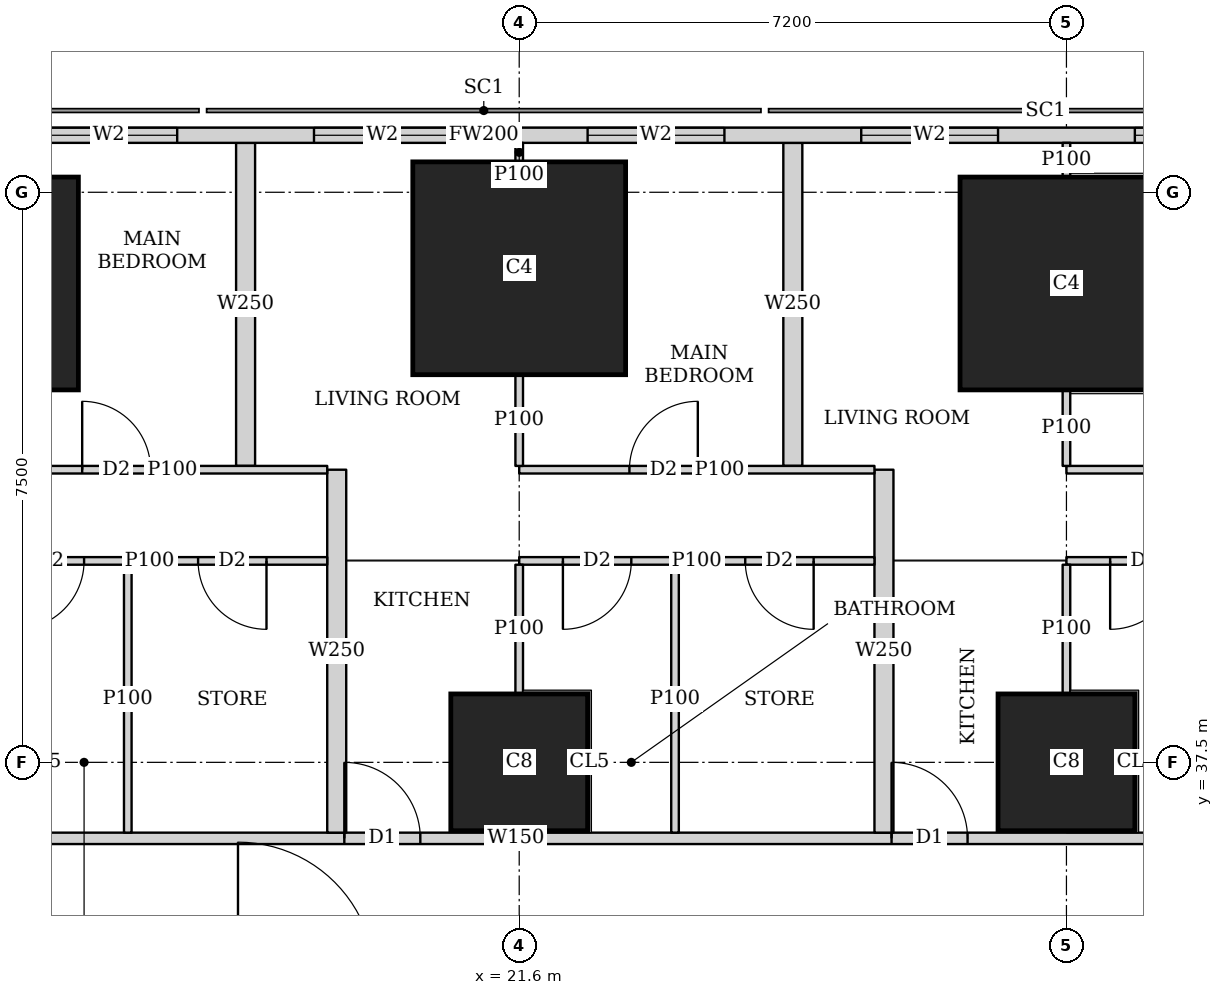
"""IFC4 building model, lengths in metres.
Left out: names, types, materials, properties, quantities, classifications, styles, units other than length and angle.
Written with IfcOpenShell. Run it as: python <this file> out.ifc"""

import sys

from ifc_helpers import new_model, si_unit, direction, frame, frame_2d, origin, origin_2d, place, context, subcontext, project, spatial, rectangle, extrude, element, fill, save


model = new_model("IFC4")
c1 = context("Model", 3, precision=1e-05, world=origin(), true_north=direction((0.0, 1.0)))
c2 = subcontext(c1, "Body", "Model", "MODEL_VIEW")
j1 = project(units=[si_unit("LENGTHUNIT", "METRE"), si_unit("PLANEANGLEUNIT", "RADIAN")], contexts=[c1])
p1 = place(None, origin())
s1 = spatial("IfcSite", under=j1, at=p1, CompositionType="ELEMENT")
p2 = place(p1, origin())
s2 = spatial("IfcBuilding", under=s1, at=p2, CompositionType="ELEMENT")
p3 = place(p2, frame((0.0, 0.0, 68.75)))
s3 = spatial("IfcBuildingStorey", under=s2, at=p3, CompositionType="ELEMENT", Elevation=68.75)
for number, where, z_axis, x_axis in (
    (1, (21.6, 37.5, 0.0), (0.0, 0.0, 1.0), (1.0, 0.0, 0.0)),
    (2, (28.8, 37.5, 0.0), (0.0, 0.0, 1.0), (1.0, 0.0, 0.0)),
):
    element("IfcColumn", number, at=place(p3, frame(where, z_axis=z_axis, x_axis=x_axis)), inside=s3, PredefinedType="COLUMN", context=c2, shape_type="SweptSolid", body=[
        extrude(rectangle(XDim=1.8, YDim=1.8, at=origin_2d()), origin(), (0.0, 0.0, 1.0), 3.75),
    ])
for number, where, z_axis, x_axis in (
    (3, (14.4, 43.8, 0.0), (0.0, 0.0, 1.0), (1.0, 0.0, 0.0)),
    (4, (21.6, 44.0, 0.0), (0.0, 0.0, 1.0), (1.0, 0.0, 0.0)),
    (5, (28.8, 43.8, 0.0), (0.0, 0.0, 1.0), (1.0, 0.0, 0.0)),
):
    element("IfcColumn", number, at=place(p3, frame(where, z_axis=z_axis, x_axis=x_axis)), inside=s3, PredefinedType="COLUMN", context=c2, shape_type="SweptSolid", body=[
        extrude(rectangle(XDim=2.8, YDim=2.8, at=origin_2d()), origin(), (0.0, 0.0, 1.0), 3.75),
    ])
p4 = place(p3, frame((40.106, 45.75, 0.0), z_axis=(0.0, 0.0, 1.0), x_axis=(-1.0, 0.0, 0.0)))
e6 = element("IfcWall", 6, at=p4, inside=s3, PredefinedType="SOLIDWALL", context=c2, shape_type="SweptSolid", body=[
    extrude(rectangle(XDim=37.943, YDim=0.2, at=frame_2d((18.971, 0.0))), origin(), (0.0, 0.0, 1.0), 3.45),
])
p5 = place(p4, frame((8.606, 0.0, 0.9)))
e7 = element("IfcOpeningElement", 7, at=p5, cuts=e6, PredefinedType="OPENING", context=c2, shape_type="SweptSolid", body=[
    extrude(rectangle(XDim=1.8, YDim=1.5, at=frame_2d((0.9, 0.75))), frame((0.0, 0.11, 0.0), z_axis=(0.0, -1.0, 0.0), x_axis=(1.0, 0.0, 0.0)), (0.0, 0.0, 1.0), 0.22),
])
p6 = place(p4, frame((12.206, 0.0, 0.9)))
e8 = element("IfcOpeningElement", 8, at=p6, cuts=e6, PredefinedType="OPENING", context=c2, shape_type="SweptSolid", body=[
    extrude(rectangle(XDim=1.8, YDim=1.5, at=frame_2d((0.9, 0.75))), frame((0.0, 0.11, 0.0), z_axis=(0.0, -1.0, 0.0), x_axis=(1.0, 0.0, 0.0)), (0.0, 0.0, 1.0), 0.22),
])
p7 = place(p4, frame((15.806, 0.0, 0.9)))
e9 = element("IfcOpeningElement", 9, at=p7, cuts=e6, PredefinedType="OPENING", context=c2, shape_type="SweptSolid", body=[
    extrude(rectangle(XDim=1.8, YDim=1.5, at=frame_2d((0.9, 0.75))), frame((0.0, 0.11, 0.0), z_axis=(0.0, -1.0, 0.0), x_axis=(1.0, 0.0, 0.0)), (0.0, 0.0, 1.0), 0.22),
])
p8 = place(p4, frame((19.406, 0.0, 0.9)))
e10 = element("IfcOpeningElement", 10, at=p8, cuts=e6, PredefinedType="OPENING", context=c2, shape_type="SweptSolid", body=[
    extrude(rectangle(XDim=1.8, YDim=1.5, at=frame_2d((0.9, 0.75))), frame((0.0, 0.11, 0.0), z_axis=(0.0, -1.0, 0.0), x_axis=(1.0, 0.0, 0.0)), (0.0, 0.0, 1.0), 0.22),
])
p9 = place(p4, frame((23.006, 0.0, 0.9)))
e11 = element("IfcOpeningElement", 11, at=p9, cuts=e6, PredefinedType="OPENING", context=c2, shape_type="SweptSolid", body=[
    extrude(rectangle(XDim=1.8, YDim=1.5, at=frame_2d((0.9, 0.75))), frame((0.0, 0.11, 0.0), z_axis=(0.0, -1.0, 0.0), x_axis=(1.0, 0.0, 0.0)), (0.0, 0.0, 1.0), 0.22),
])
p10 = place(p4, frame((26.606, 0.0, 0.9)))
e12 = element("IfcOpeningElement", 12, at=p10, cuts=e6, PredefinedType="OPENING", context=c2, shape_type="SweptSolid", body=[
    extrude(rectangle(XDim=1.8, YDim=1.5, at=frame_2d((0.9, 0.75))), frame((0.0, 0.11, 0.0), z_axis=(0.0, -1.0, 0.0), x_axis=(1.0, 0.0, 0.0)), (0.0, 0.0, 1.0), 0.22),
])
p11 = place(p3, frame((8.35, 36.5, 0.0), z_axis=(0.0, 0.0, 1.0), x_axis=(1.0, 0.0, 0.0)))
e13 = element("IfcWall", 13, at=p11, inside=s3, PredefinedType="SOLIDWALL", context=c2, shape_type="SweptSolid", body=[
    extrude(rectangle(XDim=26.415, YDim=0.15, at=frame_2d((13.208, 0.0))), origin(), (0.0, 0.0, 1.0), 3.45),
])
p12 = place(p11, frame((2.6, 0.0, 0.0)))
e14 = element("IfcOpeningElement", 14, at=p12, cuts=e13, PredefinedType="OPENING", context=c2, shape_type="SweptSolid", body=[
    extrude(rectangle(XDim=1.0, YDim=2.1, at=frame_2d((0.5, 1.05))), frame((0.0, 0.085, 0.0), z_axis=(0.0, -1.0, 0.0), x_axis=(1.0, 0.0, 0.0)), (0.0, 0.0, 1.0), 0.17),
])
p13 = place(p11, frame((10.949, 0.0, 0.0)))
e15 = element("IfcOpeningElement", 15, at=p13, cuts=e13, PredefinedType="OPENING", context=c2, shape_type="SweptSolid", body=[
    extrude(rectangle(XDim=1.0, YDim=2.1, at=frame_2d((0.5, 1.05))), frame((0.0, 0.085, 0.0), z_axis=(0.0, -1.0, 0.0), x_axis=(1.0, 0.0, 0.0)), (0.0, 0.0, 1.0), 0.17),
])
p14 = place(p11, frame((18.149, 0.0, 0.0)))
e16 = element("IfcOpeningElement", 16, at=p14, cuts=e13, PredefinedType="OPENING", context=c2, shape_type="SweptSolid", body=[
    extrude(rectangle(XDim=1.0, YDim=2.1, at=frame_2d((0.5, 1.05))), frame((0.0, 0.085, 0.0), z_axis=(0.0, -1.0, 0.0), x_axis=(1.0, 0.0, 0.0)), (0.0, 0.0, 1.0), 0.17),
])
p15 = place(p3, frame((14.4, 41.35, 0.0), z_axis=(0.0, 0.0, 1.0), x_axis=(1.0, 0.0, 0.0)))
e17 = element("IfcWall", 17, at=p15, inside=s3, PredefinedType="PARTITIONING", context=c2, shape_type="SweptSolid", body=[
    extrude(rectangle(XDim=4.674, YDim=0.1, at=frame_2d((2.337, 0.0))), origin(), (0.0, 0.0, 1.0), 3.45),
])
p16 = place(p15, frame((1.45, 0.0, 0.0)))
e18 = element("IfcOpeningElement", 18, at=p16, cuts=e17, PredefinedType="OPENING", context=c2, shape_type="SweptSolid", body=[
    extrude(rectangle(XDim=0.9, YDim=2.1, at=frame_2d((0.45, 1.05))), frame((0.0, 0.06, 0.0), z_axis=(0.0, -1.0, 0.0), x_axis=(1.0, 0.0, 0.0)), (0.0, 0.0, 1.0), 0.12),
])
p17 = place(p3, frame((14.4, 40.15, 0.0), z_axis=(0.0, 0.0, 1.0), x_axis=(1.0, 0.0, 0.0)))
e19 = element("IfcWall", 19, at=p17, inside=s3, PredefinedType="PARTITIONING", context=c2, shape_type="SweptSolid", body=[
    extrude(rectangle(XDim=4.674, YDim=0.1, at=frame_2d((2.337, 0.0))), origin(), (0.0, 0.0, 1.0), 3.45),
])
p18 = place(p17, frame((0.575, 0.0, 0.0)))
e20 = element("IfcOpeningElement", 20, at=p18, cuts=e19, PredefinedType="OPENING", context=c2, shape_type="SweptSolid", body=[
    extrude(rectangle(XDim=0.9, YDim=2.1, at=frame_2d((0.45, 1.05))), frame((0.0, 0.06, 0.0), z_axis=(0.0, -1.0, 0.0), x_axis=(1.0, 0.0, 0.0)), (0.0, 0.0, 1.0), 0.12),
])
p19 = place(p17, frame((2.975, 0.0, 0.0)))
e21 = element("IfcOpeningElement", 21, at=p19, cuts=e19, PredefinedType="OPENING", context=c2, shape_type="SweptSolid", body=[
    extrude(rectangle(XDim=0.9, YDim=2.1, at=frame_2d((0.45, 1.05))), frame((0.0, 0.06, 0.0), z_axis=(0.0, -1.0, 0.0), x_axis=(1.0, 0.0, 0.0)), (0.0, 0.0, 1.0), 0.12),
])
p20 = place(p3, frame((16.45, 36.575, 0.0), z_axis=(0.0, 0.0, 1.0), x_axis=(0.0, 1.0, 0.0)))
e22 = element("IfcWall", 22, at=p20, inside=s3, PredefinedType="PARTITIONING", context=c2, shape_type="SweptSolid", body=[
    extrude(rectangle(XDim=3.525, YDim=0.1, at=frame_2d((1.763, 0.0))), origin(), (0.0, 0.0, 1.0), 3.45),
])
p21 = place(p3, frame((21.6, 41.35, 0.0), z_axis=(0.0, 0.0, 1.0), x_axis=(1.0, 0.0, 0.0)))
e23 = element("IfcWall", 23, at=p21, inside=s3, PredefinedType="PARTITIONING", context=c2, shape_type="SweptSolid", body=[
    extrude(rectangle(XDim=4.674, YDim=0.1, at=frame_2d((2.337, 0.0))), origin(), (0.0, 0.0, 1.0), 3.45),
])
p22 = place(p21, frame((1.45, 0.0, 0.0)))
e24 = element("IfcOpeningElement", 24, at=p22, cuts=e23, PredefinedType="OPENING", context=c2, shape_type="SweptSolid", body=[
    extrude(rectangle(XDim=0.9, YDim=2.1, at=frame_2d((0.45, 1.05))), frame((0.0, 0.06, 0.0), z_axis=(0.0, -1.0, 0.0), x_axis=(1.0, 0.0, 0.0)), (0.0, 0.0, 1.0), 0.12),
])
p23 = place(p3, frame((21.6, 40.15, 0.0), z_axis=(0.0, 0.0, 1.0), x_axis=(1.0, 0.0, 0.0)))
e25 = element("IfcWall", 25, at=p23, inside=s3, PredefinedType="PARTITIONING", context=c2, shape_type="SweptSolid", body=[
    extrude(rectangle(XDim=4.674, YDim=0.1, at=frame_2d((2.337, 0.0))), origin(), (0.0, 0.0, 1.0), 3.45),
])
p24 = place(p23, frame((0.575, 0.0, 0.0)))
e26 = element("IfcOpeningElement", 26, at=p24, cuts=e25, PredefinedType="OPENING", context=c2, shape_type="SweptSolid", body=[
    extrude(rectangle(XDim=0.9, YDim=2.1, at=frame_2d((0.45, 1.05))), frame((0.0, 0.06, 0.0), z_axis=(0.0, -1.0, 0.0), x_axis=(1.0, 0.0, 0.0)), (0.0, 0.0, 1.0), 0.12),
])
p25 = place(p23, frame((2.974, 0.0, 0.0)))
e27 = element("IfcOpeningElement", 27, at=p25, cuts=e25, PredefinedType="OPENING", context=c2, shape_type="SweptSolid", body=[
    extrude(rectangle(XDim=0.9, YDim=2.1, at=frame_2d((0.45, 1.05))), frame((0.0, 0.06, 0.0), z_axis=(0.0, -1.0, 0.0), x_axis=(1.0, 0.0, 0.0)), (0.0, 0.0, 1.0), 0.12),
])
p26 = place(p3, frame((21.6, 41.4, 0.0), z_axis=(0.0, 0.0, 1.0), x_axis=(0.0, 1.0, 0.0)))
e28 = element("IfcWall", 28, at=p26, inside=s3, PredefinedType="PARTITIONING", context=c2, shape_type="SweptSolid", body=[
    extrude(rectangle(XDim=1.199, YDim=0.1, at=frame_2d((0.6, 0.0))), origin(), (0.0, 0.0, 1.0), 3.45),
])
p27 = place(p3, frame((21.6, 45.401, 0.0), z_axis=(0.0, 0.0, 1.0), x_axis=(0.0, 1.0, 0.0)))
e29 = element("IfcWall", 29, at=p27, inside=s3, PredefinedType="PARTITIONING", context=c2, shape_type="SweptSolid", body=[
    extrude(rectangle(XDim=0.249, YDim=0.1, at=frame_2d((0.125, 0.0))), origin(), (0.0, 0.0, 1.0), 3.45),
])
p28 = place(p3, frame((21.6, 38.401, 0.0), z_axis=(0.0, 0.0, 1.0), x_axis=(0.0, 1.0, 0.0)))
e30 = element("IfcWall", 30, at=p28, inside=s3, PredefinedType="PARTITIONING", context=c2, shape_type="SweptSolid", body=[
    extrude(rectangle(XDim=1.699, YDim=0.1, at=frame_2d((0.85, 0.0))), origin(), (0.0, 0.0, 1.0), 3.45),
])
p29 = place(p3, frame((23.65, 36.575, 0.0), z_axis=(0.0, 0.0, 1.0), x_axis=(0.0, 1.0, 0.0)))
e31 = element("IfcWall", 31, at=p29, inside=s3, PredefinedType="PARTITIONING", context=c2, shape_type="SweptSolid", body=[
    extrude(rectangle(XDim=3.525, YDim=0.1, at=frame_2d((1.763, 0.0))), origin(), (0.0, 0.0, 1.0), 3.45),
])
p30 = place(p3, frame((18.0, 41.4, 0.0), z_axis=(0.0, 0.0, 1.0), x_axis=(0.0, 1.0, 0.0)))
e32 = element("IfcWall", 32, at=p30, inside=s3, PredefinedType="SOLIDWALL", context=c2, shape_type="SweptSolid", body=[
    extrude(rectangle(XDim=4.25, YDim=0.25, at=frame_2d((2.125, 0.0))), origin(), (0.0, 0.0, 1.0), 2.0),
])
p31 = place(p3, frame((19.199, 36.575, 0.0), z_axis=(0.0, 0.0, 1.0), x_axis=(0.0, 1.0, 0.0)))
e33 = element("IfcWall", 33, at=p31, inside=s3, PredefinedType="SOLIDWALL", context=c2, shape_type="SweptSolid", body=[
    extrude(rectangle(XDim=4.775, YDim=0.25, at=frame_2d((2.388, 0.0))), origin(), (0.0, 0.0, 1.0), 3.45),
])
p32 = place(p3, frame((28.8, 41.35, 0.0), z_axis=(0.0, 0.0, 1.0), x_axis=(1.0, 0.0, 0.0)))
e34 = element("IfcWall", 34, at=p32, inside=s3, PredefinedType="PARTITIONING", context=c2, shape_type="SweptSolid", body=[
    extrude(rectangle(XDim=5.053, YDim=0.1, at=frame_2d((2.526, 0.0))), origin(), (0.0, 0.0, 1.0), 3.45),
])
p33 = place(p32, frame((1.45, 0.0, 0.0)))
e35 = element("IfcOpeningElement", 35, at=p33, cuts=e34, PredefinedType="OPENING", context=c2, shape_type="SweptSolid", body=[
    extrude(rectangle(XDim=0.9, YDim=2.1, at=frame_2d((0.45, 1.05))), frame((0.0, 0.06, 0.0), z_axis=(0.0, -1.0, 0.0), x_axis=(1.0, 0.0, 0.0)), (0.0, 0.0, 1.0), 0.12),
])
p34 = place(p3, frame((28.8, 40.15, 0.0), z_axis=(0.0, 0.0, 1.0), x_axis=(1.0, 0.0, 0.0)))
e36 = element("IfcWall", 36, at=p34, inside=s3, PredefinedType="PARTITIONING", context=c2, shape_type="SweptSolid", body=[
    extrude(rectangle(XDim=5.28, YDim=0.1, at=frame_2d((2.64, 0.0))), origin(), (0.0, 0.0, 1.0), 3.45),
])
p35 = place(p34, frame((0.575, 0.0, 0.0)))
e37 = element("IfcOpeningElement", 37, at=p35, cuts=e36, PredefinedType="OPENING", context=c2, shape_type="SweptSolid", body=[
    extrude(rectangle(XDim=0.9, YDim=2.1, at=frame_2d((0.45, 1.05))), frame((0.0, 0.06, 0.0), z_axis=(0.0, -1.0, 0.0), x_axis=(1.0, 0.0, 0.0)), (0.0, 0.0, 1.0), 0.12),
])
p36 = place(p34, frame((4.23, 0.0, 0.0)))
e38 = element("IfcOpeningElement", 38, at=p36, cuts=e36, PredefinedType="OPENING", context=c2, shape_type="SweptSolid", body=[
    extrude(rectangle(XDim=0.9, YDim=2.1, at=frame_2d((0.45, 1.05))), frame((0.0, 0.06, 0.0), z_axis=(0.0, -1.0, 0.0), x_axis=(1.0, 0.0, 0.0)), (0.0, 0.0, 1.0), 0.12),
])
p37 = place(p34, frame((2.375, 0.0, 0.0)))
e39 = element("IfcOpeningElement", 39, at=p37, cuts=e36, PredefinedType="OPENING", context=c2, shape_type="SweptSolid", body=[
    extrude(rectangle(XDim=0.9, YDim=2.1, at=frame_2d((0.45, 1.05))), frame((0.0, 0.06, 0.0), z_axis=(0.0, -1.0, 0.0), x_axis=(1.0, 0.0, 0.0)), (0.0, 0.0, 1.0), 0.12),
])
p38 = place(p3, frame((28.8, 41.4, 0.0), z_axis=(0.0, 0.0, 1.0), x_axis=(0.0, 1.0, 0.0)))
e40 = element("IfcWall", 40, at=p38, inside=s3, PredefinedType="PARTITIONING", context=c2, shape_type="SweptSolid", body=[
    extrude(rectangle(XDim=0.999, YDim=0.1, at=frame_2d((0.5, 0.0))), origin(), (0.0, 0.0, 1.0), 3.45),
])
p39 = place(p3, frame((28.8, 45.201, 0.0), z_axis=(0.0, 0.0, 1.0), x_axis=(0.0, 1.0, 0.0)))
e41 = element("IfcWall", 41, at=p39, inside=s3, PredefinedType="PARTITIONING", context=c2, shape_type="SweptSolid", body=[
    extrude(rectangle(XDim=0.449, YDim=0.1, at=frame_2d((0.225, 0.0))), origin(), (0.0, 0.0, 1.0), 3.45),
])
p40 = place(p3, frame((28.8, 38.401, 0.0), z_axis=(0.0, 0.0, 1.0), x_axis=(0.0, 1.0, 0.0)))
e42 = element("IfcWall", 42, at=p40, inside=s3, PredefinedType="PARTITIONING", context=c2, shape_type="SweptSolid", body=[
    extrude(rectangle(XDim=1.699, YDim=0.1, at=frame_2d((0.85, 0.0))), origin(), (0.0, 0.0, 1.0), 3.45),
])
p41 = place(p3, frame((25.2, 41.4, 0.0), z_axis=(0.0, 0.0, 1.0), x_axis=(0.0, 1.0, 0.0)))
e43 = element("IfcWall", 43, at=p41, inside=s3, PredefinedType="SOLIDWALL", context=c2, shape_type="SweptSolid", body=[
    extrude(rectangle(XDim=4.25, YDim=0.25, at=frame_2d((2.125, 0.0))), origin(), (0.0, 0.0, 1.0), 2.0),
])
p42 = place(p3, frame((26.399, 36.575, 0.0), z_axis=(0.0, 0.0, 1.0), x_axis=(0.0, 1.0, 0.0)))
e44 = element("IfcWall", 44, at=p42, inside=s3, PredefinedType="SOLIDWALL", context=c2, shape_type="SweptSolid", body=[
    extrude(rectangle(XDim=4.775, YDim=0.25, at=frame_2d((2.388, 0.0))), origin(), (0.0, 0.0, 1.0), 3.45),
])
p43 = place(p5, origin())
e45 = element("IfcWindow", 45, at=p43, inside=s3, PartitioningType="SINGLE_PANEL", PredefinedType="WINDOW", context=c2, shape_type="SweptSolid", body=[
    extrude(rectangle(XDim=1.8, YDim=1.5, at=frame_2d((0.9, 0.75))), frame((0.0, 0.03, 0.0), z_axis=(0.0, -1.0, 0.0), x_axis=(1.0, 0.0, 0.0)), (0.0, 0.0, 1.0), 0.06),
])
fill(e7, e45)
p44 = place(p6, origin())
e46 = element("IfcWindow", 46, at=p44, inside=s3, PartitioningType="SINGLE_PANEL", PredefinedType="WINDOW", context=c2, shape_type="SweptSolid", body=[
    extrude(rectangle(XDim=1.8, YDim=1.5, at=frame_2d((0.9, 0.75))), frame((0.0, 0.03, 0.0), z_axis=(0.0, -1.0, 0.0), x_axis=(1.0, 0.0, 0.0)), (0.0, 0.0, 1.0), 0.06),
])
fill(e8, e46)
p45 = place(p7, origin())
e47 = element("IfcWindow", 47, at=p45, inside=s3, PartitioningType="SINGLE_PANEL", PredefinedType="WINDOW", context=c2, shape_type="SweptSolid", body=[
    extrude(rectangle(XDim=1.8, YDim=1.5, at=frame_2d((0.9, 0.75))), frame((0.0, 0.03, 0.0), z_axis=(0.0, -1.0, 0.0), x_axis=(1.0, 0.0, 0.0)), (0.0, 0.0, 1.0), 0.06),
])
fill(e9, e47)
p46 = place(p8, origin())
e48 = element("IfcWindow", 48, at=p46, inside=s3, PartitioningType="SINGLE_PANEL", PredefinedType="WINDOW", context=c2, shape_type="SweptSolid", body=[
    extrude(rectangle(XDim=1.8, YDim=1.5, at=frame_2d((0.9, 0.75))), frame((0.0, 0.03, 0.0), z_axis=(0.0, -1.0, 0.0), x_axis=(1.0, 0.0, 0.0)), (0.0, 0.0, 1.0), 0.06),
])
fill(e10, e48)
p47 = place(p9, origin())
e49 = element("IfcWindow", 49, at=p47, inside=s3, PartitioningType="SINGLE_PANEL", PredefinedType="WINDOW", context=c2, shape_type="SweptSolid", body=[
    extrude(rectangle(XDim=1.8, YDim=1.5, at=frame_2d((0.9, 0.75))), frame((0.0, 0.03, 0.0), z_axis=(0.0, -1.0, 0.0), x_axis=(1.0, 0.0, 0.0)), (0.0, 0.0, 1.0), 0.06),
])
fill(e11, e49)
p48 = place(p16, origin())
e50 = element("IfcDoor", 50, at=p48, inside=s3, OperationType="SINGLE_SWING_LEFT", PredefinedType="DOOR", context=c2, shape_type="SweptSolid", body=[
    extrude(rectangle(XDim=0.9, YDim=2.1, at=frame_2d((0.45, 1.05))), frame((0.0, 0.025, 0.0), z_axis=(0.0, -1.0, 0.0), x_axis=(1.0, 0.0, 0.0)), (0.0, 0.0, 1.0), 0.05),
])
fill(e18, e50)
p49 = place(p18, origin())
e51 = element("IfcDoor", 51, at=p49, inside=s3, OperationType="SINGLE_SWING_RIGHT", PredefinedType="DOOR", context=c2, shape_type="SweptSolid", body=[
    extrude(rectangle(XDim=0.9, YDim=2.1, at=frame_2d((0.45, 1.05))), frame((0.0, 0.025, 0.0), z_axis=(0.0, -1.0, 0.0), x_axis=(1.0, 0.0, 0.0)), (0.0, 0.0, 1.0), 0.05),
])
fill(e20, e51)
p50 = place(p19, origin())
e52 = element("IfcDoor", 52, at=p50, inside=s3, OperationType="SINGLE_SWING_LEFT", PredefinedType="DOOR", context=c2, shape_type="SweptSolid", body=[
    extrude(rectangle(XDim=0.9, YDim=2.1, at=frame_2d((0.45, 1.05))), frame((0.0, 0.025, 0.0), z_axis=(0.0, -1.0, 0.0), x_axis=(1.0, 0.0, 0.0)), (0.0, 0.0, 1.0), 0.05),
])
fill(e21, e52)
p51 = place(p22, origin())
e53 = element("IfcDoor", 53, at=p51, inside=s3, OperationType="SINGLE_SWING_RIGHT", PredefinedType="DOOR", context=c2, shape_type="SweptSolid", body=[
    extrude(rectangle(XDim=0.9, YDim=2.1, at=frame_2d((0.45, 1.05))), frame((0.0, 0.025, 0.0), z_axis=(0.0, -1.0, 0.0), x_axis=(1.0, 0.0, 0.0)), (0.0, 0.0, 1.0), 0.05),
])
fill(e24, e53)
p52 = place(p24, origin())
e54 = element("IfcDoor", 54, at=p52, inside=s3, OperationType="SINGLE_SWING_RIGHT", PredefinedType="DOOR", context=c2, shape_type="SweptSolid", body=[
    extrude(rectangle(XDim=0.9, YDim=2.1, at=frame_2d((0.45, 1.05))), frame((0.0, 0.025, 0.0), z_axis=(0.0, -1.0, 0.0), x_axis=(1.0, 0.0, 0.0)), (0.0, 0.0, 1.0), 0.05),
])
fill(e26, e54)
p53 = place(p25, origin())
e55 = element("IfcDoor", 55, at=p53, inside=s3, OperationType="SINGLE_SWING_LEFT", PredefinedType="DOOR", context=c2, shape_type="SweptSolid", body=[
    extrude(rectangle(XDim=0.9, YDim=2.1, at=frame_2d((0.45, 1.05))), frame((0.0, 0.025, 0.0), z_axis=(0.0, -1.0, 0.0), x_axis=(1.0, 0.0, 0.0)), (0.0, 0.0, 1.0), 0.05),
])
fill(e27, e55)
p54 = place(p13, origin())
e56 = element("IfcDoor", 56, at=p54, inside=s3, OperationType="SINGLE_SWING_LEFT", PredefinedType="DOOR", context=c2, shape_type="SweptSolid", body=[
    extrude(rectangle(XDim=1.0, YDim=2.1, at=frame_2d((0.5, 1.05))), frame((0.0, 0.025, 0.0), z_axis=(0.0, -1.0, 0.0), x_axis=(1.0, 0.0, 0.0)), (0.0, 0.0, 1.0), 0.05),
])
fill(e15, e56)
p55 = place(p35, origin())
e57 = element("IfcDoor", 57, at=p55, inside=s3, OperationType="SINGLE_SWING_RIGHT", PredefinedType="DOOR", context=c2, shape_type="SweptSolid", body=[
    extrude(rectangle(XDim=0.9, YDim=2.1, at=frame_2d((0.45, 1.05))), frame((0.0, 0.025, 0.0), z_axis=(0.0, -1.0, 0.0), x_axis=(1.0, 0.0, 0.0)), (0.0, 0.0, 1.0), 0.05),
])
fill(e37, e57)
p56 = place(p14, origin())
e58 = element("IfcDoor", 58, at=p56, inside=s3, OperationType="SINGLE_SWING_LEFT", PredefinedType="DOOR", context=c2, shape_type="SweptSolid", body=[
    extrude(rectangle(XDim=1.0, YDim=2.1, at=frame_2d((0.5, 1.05))), frame((0.0, 0.025, 0.0), z_axis=(0.0, -1.0, 0.0), x_axis=(1.0, 0.0, 0.0)), (0.0, 0.0, 1.0), 0.05),
])
fill(e16, e58)
save(model, sys.argv[1])
